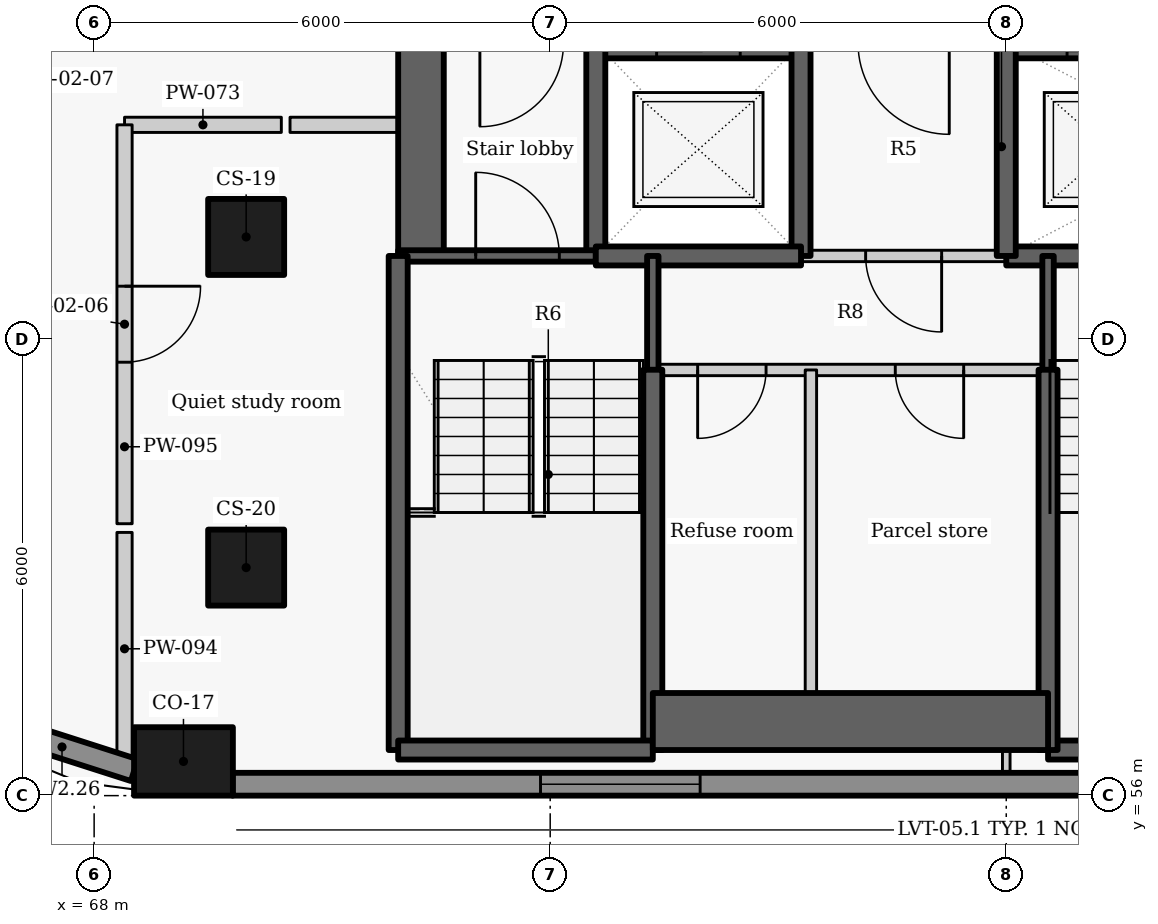
"""IFC4 building model, lengths in metres.
Left out: names, types, materials, properties, quantities, classifications, styles, units other than length and angle.
Written with IfcOpenShell. Run it as: python <this file> out.ifc"""

import sys

from ifc_helpers import new_model, si_unit, direction, frame, frame_2d, origin, origin_2d, place, context, subcontext, project, spatial, rectangle, extrude, element, fill, save


model = new_model("IFC4")
c1 = context("Model", 3, precision=1e-05, world=origin(), true_north=direction((0.0, 1.0)))
c2 = subcontext(c1, "Body", "Model", "MODEL_VIEW")
j1 = project(units=[si_unit("LENGTHUNIT", "METRE"), si_unit("PLANEANGLEUNIT", "RADIAN")], contexts=[c1])
p1 = place(None, origin())
s1 = spatial("IfcSite", under=j1, at=p1, CompositionType="ELEMENT")
p2 = place(p1, origin())
s2 = spatial("IfcBuilding", under=s1, at=p2, CompositionType="ELEMENT")
p3 = place(p2, frame((0.0, 0.0, 130.5)))
s3 = spatial("IfcBuildingStorey", under=s2, at=p3, CompositionType="ELEMENT", Elevation=130.5)
p4 = place(p3, frame((69.175, 56.45, 0.0), z_axis=(0.0, 0.0, 1.0), x_axis=(1.0, 0.0, 0.0)))
e1 = element("IfcColumn", 1, at=p4, inside=s3, PredefinedType="COLUMN", context=c2, shape_type="SweptSolid", body=[
    extrude(rectangle(XDim=1.3, YDim=0.9, at=origin_2d()), origin(), (0.0, 0.0, 1.0), 3.3),
])
for number, where, z_axis, x_axis in (
    (2, (70.0, 63.35, 0.0), (0.0, 0.0, 1.0), (0.0, -1.0, 0.0)),
    (3, (70.0, 59.0, 0.0), (0.0, 0.0, 1.0), (0.0, -1.0, 0.0)),
):
    element("IfcColumn", number, at=place(p3, frame(where, z_axis=z_axis, x_axis=x_axis)), inside=s3, PredefinedType="COLUMN", context=c2, shape_type="SweptSolid", body=[
        extrude(rectangle(XDim=1.0, YDim=1.0, at=origin_2d()), origin(), (0.0, 0.0, 1.0), 3.3),
    ])
p5 = place(p3, frame((66.626, 56.946, 0.0), z_axis=(0.0, 0.0, 1.0), x_axis=(0.952201240673, -0.305471434444, 0.0)))
e4 = element("IfcWall", 4, at=p5, inside=s3, PredefinedType="SOLIDWALL", context=c2, shape_type="SweptSolid", body=[
    extrude(rectangle(XDim=1.999, YDim=0.3, at=frame_2d((1.0, 0.0))), origin(), (0.0, 0.0, 1.0), 2.425),
])
p6 = place(p3, frame((69.821, 56.15, 0.0), z_axis=(0.0, 0.0, 1.0), x_axis=(1.0, 0.0, 0.0)))
e5 = element("IfcWall", 5, at=p6, inside=s3, PredefinedType="SOLIDWALL", context=c2, shape_type="SweptSolid", body=[
    extrude(rectangle(XDim=20.04, YDim=0.3, at=frame_2d((10.02, 0.0))), origin(), (0.0, 0.0, 1.0), 2.425),
])
p7 = place(p6, frame((4.051, 0.0, 0.9)))
e6 = element("IfcOpeningElement", 6, at=p7, cuts=e5, PredefinedType="OPENING", context=c2, shape_type="SweptSolid", body=[
    extrude(rectangle(XDim=2.1, YDim=1.1, at=frame_2d((1.05, 0.55))), frame((0.0, 0.16, 0.0), z_axis=(0.0, -1.0, 0.0), x_axis=(1.0, 0.0, 0.0)), (0.0, 0.0, 1.0), 0.32),
])
p8 = place(p6, frame((14.047, 0.0, 0.9)))
e7 = element("IfcOpeningElement", 7, at=p8, cuts=e5, PredefinedType="OPENING", context=c2, shape_type="SweptSolid", body=[
    extrude(rectangle(XDim=2.1, YDim=1.1, at=frame_2d((1.05, 0.55))), frame((0.0, 0.16, 0.0), z_axis=(0.0, -1.0, 0.0), x_axis=(1.0, 0.0, 0.0)), (0.0, 0.0, 1.0), 0.32),
])
p9 = place(p3, frame((72.3, 63.1, -0.275), z_axis=(0.0, 0.0, 1.0), x_axis=(0.0, 1.0, 0.0)))
e8 = element("IfcWall", 8, at=p9, inside=s3, PredefinedType="SHEAR", context=c2, shape_type="SweptSolid", body=[
    extrude(rectangle(XDim=9.1, YDim=0.6, at=frame_2d((4.55, 0.0))), origin(), (0.0, 0.0, 1.0), 3.3),
])
p10 = place(p9, frame((3.748, 0.0, 0.275)))
e9 = element("IfcOpeningElement", 9, at=p10, cuts=e8, PredefinedType="OPENING", context=c2, shape_type="SweptSolid", body=[
    extrude(rectangle(XDim=1.5, YDim=2.1, at=frame_2d((0.75, 1.05))), frame((0.0, 0.31, 0.0), z_axis=(0.0, -1.0, 0.0), x_axis=(1.0, 0.0, 0.0)), (0.0, 0.0, 1.0), 0.62),
])
p11 = place(p3, frame((74.597, 65.9, -0.275), z_axis=(0.0, 0.0, 1.0), x_axis=(1.0, 0.0, 0.0)))
e10 = element("IfcWall", 10, at=p11, inside=s3, PredefinedType="SHEAR", context=c2, shape_type="SweptSolid", body=[
    extrude(rectangle(XDim=2.706, YDim=0.4, at=frame_2d((1.353, 0.0))), origin(), (0.0, 0.0, 1.0), 3.3),
])
p12 = place(p11, frame((0.803, 0.0, 0.275)))
e11 = element("IfcOpeningElement", 11, at=p12, cuts=e10, PredefinedType="OPENING", context=c2, shape_type="SweptSolid", body=[
    extrude(rectangle(XDim=1.1, YDim=2.1, at=frame_2d((0.55, 1.05))), frame((0.0, 0.21, 0.0), z_axis=(0.0, -1.0, 0.0), x_axis=(1.0, 0.0, 0.0)), (0.0, 0.0, 1.0), 0.42),
])
p13 = place(p3, frame((79.997, 65.9, -0.275), z_axis=(0.0, 0.0, 1.0), x_axis=(1.0, 0.0, 0.0)))
e12 = element("IfcWall", 12, at=p13, inside=s3, PredefinedType="SHEAR", context=c2, shape_type="SweptSolid", body=[
    extrude(rectangle(XDim=5.406, YDim=0.4, at=frame_2d((2.703, 0.0))), origin(), (0.0, 0.0, 1.0), 3.3),
])
p14 = place(p13, frame((0.803, 0.0, 0.275)))
e13 = element("IfcOpeningElement", 13, at=p14, cuts=e12, PredefinedType="OPENING", context=c2, shape_type="SweptSolid", body=[
    extrude(rectangle(XDim=1.1, YDim=2.1, at=frame_2d((0.55, 1.05))), frame((0.0, 0.21, 0.0), z_axis=(0.0, -1.0, 0.0), x_axis=(1.0, 0.0, 0.0)), (0.0, 0.0, 1.0), 0.42),
])
p15 = place(p3, frame((74.6, 63.1, -0.275), z_axis=(0.0, 0.0, 1.0), x_axis=(0.0, 1.0, 0.0)))
e14 = element("IfcWall", 14, at=p15, inside=s3, PredefinedType="SHEAR", context=c2, shape_type="SweptSolid", body=[
    extrude(rectangle(XDim=2.8, YDim=0.25, at=frame_2d((1.4, 0.0))), origin(), (0.0, 0.0, 1.0), 3.3),
])
p16 = place(p3, frame((72.0, 63.1, -0.275), z_axis=(0.0, 0.0, 1.0), x_axis=(1.0, 0.0, 0.0)))
e15 = element("IfcWall", 15, at=p16, inside=s3, PredefinedType="SHEAR", context=c2, shape_type="SweptSolid", body=[
    extrude(rectangle(XDim=2.6, YDim=0.15, at=frame_2d((1.3, 0.0))), origin(), (0.0, 0.0, 1.0), 3.3),
])
p17 = place(p16, frame((1.02, 0.0, 0.275)))
e16 = element("IfcOpeningElement", 16, at=p17, cuts=e15, PredefinedType="OPENING", context=c2, shape_type="SweptSolid", body=[
    extrude(rectangle(XDim=1.1, YDim=2.1, at=frame_2d((0.55, 1.05))), frame((0.0, 0.085, 0.0), z_axis=(0.0, -1.0, 0.0), x_axis=(1.0, 0.0, 0.0)), (0.0, 0.0, 1.0), 0.17),
])
p18 = place(p3, frame((77.3, 63.1, -0.275), z_axis=(0.0, 0.0, 1.0), x_axis=(0.0, 1.0, 0.0)))
e17 = element("IfcWall", 17, at=p18, inside=s3, PredefinedType="SHEAR", context=c2, shape_type="SweptSolid", body=[
    extrude(rectangle(XDim=2.8, YDim=0.25, at=frame_2d((1.4, 0.0))), origin(), (0.0, 0.0, 1.0), 3.3),
])
p19 = place(p3, frame((74.6, 63.1, -0.275), z_axis=(0.0, 0.0, 1.0), x_axis=(1.0, 0.0, 0.0)))
e18 = element("IfcWall", 18, at=p19, inside=s3, PredefinedType="SHEAR", context=c2, shape_type="SweptSolid", body=[
    extrude(rectangle(XDim=2.7, YDim=0.25, at=frame_2d((1.35, 0.0))), origin(), (0.0, 0.0, 1.0), 3.3),
])
p20 = place(p3, frame((80.0, 63.1, -0.275), z_axis=(0.0, 0.0, 1.0), x_axis=(1.0, 0.0, 0.0)))
e19 = element("IfcWall", 19, at=p20, inside=s3, PredefinedType="SHEAR", context=c2, shape_type="SweptSolid", body=[
    extrude(rectangle(XDim=8.0, YDim=0.25, at=frame_2d((4.0, 0.0))), origin(), (0.0, 0.0, 1.0), 3.3),
])
p21 = place(p20, frame((3.849, 0.0, 0.275)))
e20 = element("IfcOpeningElement", 20, at=p21, cuts=e19, PredefinedType="OPENING", context=c2, shape_type="SweptSolid", body=[
    extrude(rectangle(XDim=1.1, YDim=2.1, at=frame_2d((0.55, 1.05))), frame((0.0, 0.135, 0.0), z_axis=(0.0, -1.0, 0.0), x_axis=(1.0, 0.0, 0.0)), (0.0, 0.0, 1.0), 0.27),
])
p22 = place(p3, frame((80.0, 63.1, -0.275), z_axis=(0.0, 0.0, 1.0), x_axis=(0.0, 1.0, 0.0)))
e21 = element("IfcWall", 21, at=p22, inside=s3, PredefinedType="SHEAR", context=c2, shape_type="SweptSolid", body=[
    extrude(rectangle(XDim=2.8, YDim=0.25, at=frame_2d((1.4, 0.0))), origin(), (0.0, 0.0, 1.0), 3.3),
])
p23 = place(p3, frame((80.0, 63.1, 0.0), z_axis=(0.0, 0.0, 1.0), x_axis=(-1.0, 0.0, 0.0)))
e22 = element("IfcWall", 22, at=p23, inside=s3, PredefinedType="PARTITIONING", context=c2, shape_type="SweptSolid", body=[
    extrude(rectangle(XDim=2.7, YDim=0.15, at=frame_2d((1.35, 0.0))), origin(), (0.0, 0.0, 1.0), 3.025),
])
p24 = place(p23, frame((0.85, 0.0, 0.0)))
e23 = element("IfcOpeningElement", 23, at=p24, cuts=e22, PredefinedType="OPENING", context=c2, shape_type="SweptSolid", body=[
    extrude(rectangle(XDim=1.0, YDim=2.1, at=frame_2d((0.5, 1.05))), frame((0.0, 0.085, 0.0), z_axis=(0.0, -1.0, 0.0), x_axis=(1.0, 0.0, 0.0)), (0.0, 0.0, 1.0), 0.17),
])
p25 = place(p3, frame((75.35, 61.597, -0.275), z_axis=(0.0, 0.0, 1.0), x_axis=(0.0, 1.0, 0.0)))
e24 = element("IfcWall", 24, at=p25, inside=s3, PredefinedType="SHEAR", context=c2, shape_type="SweptSolid", body=[
    extrude(rectangle(XDim=1.503, YDim=0.15, at=frame_2d((0.751, 0.0))), origin(), (0.0, 0.0, 1.0), 3.3),
])
p26 = place(p3, frame((75.35, 56.6, -0.275), z_axis=(0.0, 0.0, 1.0), x_axis=(0.0, 1.0, 0.0)))
e25 = element("IfcWall", 25, at=p26, inside=s3, PredefinedType="SHEAR", context=c2, shape_type="SweptSolid", body=[
    extrude(rectangle(XDim=5.003, YDim=0.25, at=frame_2d((2.501, 0.0))), origin(), (0.0, 0.0, 1.0), 3.3),
])
p27 = place(p3, frame((72.0, 56.6, -0.275), z_axis=(0.0, 0.0, 1.0), x_axis=(0.0, 1.0, 0.0)))
e26 = element("IfcWall", 26, at=p27, inside=s3, PredefinedType="SHEAR", context=c2, shape_type="SweptSolid", body=[
    extrude(rectangle(XDim=6.5, YDim=0.25, at=frame_2d((3.25, 0.0))), origin(), (0.0, 0.0, 1.0), 3.3),
])
p28 = place(p3, frame((72.0, 56.6, -0.275), z_axis=(0.0, 0.0, 1.0), x_axis=(1.0, 0.0, 0.0)))
e27 = element("IfcWall", 27, at=p28, inside=s3, PredefinedType="SHEAR", context=c2, shape_type="SweptSolid", body=[
    extrude(rectangle(XDim=3.35, YDim=0.25, at=frame_2d((1.675, 0.0))), origin(), (0.0, 0.0, 1.0), 3.3),
])
p29 = place(p3, frame((80.55, 56.6, -0.275), z_axis=(0.0, 0.0, 1.0), x_axis=(1.0, 0.0, 0.0)))
e28 = element("IfcWall", 28, at=p29, inside=s3, PredefinedType="SHEAR", context=c2, shape_type="SweptSolid", body=[
    extrude(rectangle(XDim=2.85, YDim=0.25, at=frame_2d((1.425, 0.0))), origin(), (0.0, 0.0, 1.0), 3.3),
])
p30 = place(p3, frame((80.55, 61.597, -0.275), z_axis=(0.0, 0.0, 1.0), x_axis=(0.0, 1.0, 0.0)))
e29 = element("IfcWall", 29, at=p30, inside=s3, PredefinedType="SHEAR", context=c2, shape_type="SweptSolid", body=[
    extrude(rectangle(XDim=1.503, YDim=0.15, at=frame_2d((0.751, 0.0))), origin(), (0.0, 0.0, 1.0), 3.3),
])
p31 = place(p3, frame((80.55, 56.6, -0.275), z_axis=(0.0, 0.0, 1.0), x_axis=(0.0, 1.0, 0.0)))
e30 = element("IfcWall", 30, at=p31, inside=s3, PredefinedType="SHEAR", context=c2, shape_type="SweptSolid", body=[
    extrude(rectangle(XDim=5.003, YDim=0.25, at=frame_2d((2.501, 0.0))), origin(), (0.0, 0.0, 1.0), 3.3),
])
p32 = place(p3, frame((75.35, 56.975, -0.275), z_axis=(0.0, 0.0, 1.0), x_axis=(1.0, 0.0, 0.0)))
e31 = element("IfcWall", 31, at=p32, inside=s3, PredefinedType="SHEAR", context=c2, shape_type="SweptSolid", body=[
    extrude(rectangle(XDim=5.2, YDim=0.75, at=frame_2d((2.6, 0.0))), origin(), (0.0, 0.0, 1.0), 3.3),
])
p33 = place(p3, frame((80.55, 61.6, 0.0), z_axis=(0.0, 0.0, 1.0), x_axis=(-1.0, 0.0, 0.0)))
e32 = element("IfcWall", 32, at=p33, inside=s3, PredefinedType="PARTITIONING", context=c2, shape_type="SweptSolid", body=[
    extrude(rectangle(XDim=5.2, YDim=0.15, at=frame_2d((2.6, 0.0))), origin(), (0.0, 0.0, 1.0), 3.025),
])
p34 = place(p33, frame((3.71, 0.0, 0.0)))
e33 = element("IfcOpeningElement", 33, at=p34, cuts=e32, PredefinedType="OPENING", context=c2, shape_type="SweptSolid", body=[
    extrude(rectangle(XDim=0.9, YDim=2.1, at=frame_2d((0.45, 1.05))), frame((0.0, 0.085, 0.0), z_axis=(0.0, -1.0, 0.0), x_axis=(1.0, 0.0, 0.0)), (0.0, 0.0, 1.0), 0.17),
])
p35 = place(p33, frame((1.11, 0.0, 0.0)))
e34 = element("IfcOpeningElement", 34, at=p35, cuts=e32, PredefinedType="OPENING", context=c2, shape_type="SweptSolid", body=[
    extrude(rectangle(XDim=0.9, YDim=2.1, at=frame_2d((0.45, 1.05))), frame((0.0, 0.085, 0.0), z_axis=(0.0, -1.0, 0.0), x_axis=(1.0, 0.0, 0.0)), (0.0, 0.0, 1.0), 0.17),
])
p36 = place(p3, frame((77.43, 56.6, 0.0), z_axis=(0.0, 0.0, 1.0), x_axis=(0.0, 1.0, 0.0)))
e35 = element("IfcWall", 35, at=p36, inside=s3, PredefinedType="PARTITIONING", context=c2, shape_type="SweptSolid", body=[
    extrude(rectangle(XDim=5.0, YDim=0.15, at=frame_2d((2.5, 0.0))), origin(), (0.0, 0.0, 1.0), 3.025),
])
p37 = place(p3, frame((68.4, 64.825, 0.0), z_axis=(0.0, 0.0, 1.0), x_axis=(1.0, 0.0, 0.0)))
e36 = element("IfcWall", 36, at=p37, inside=s3, PredefinedType="PARTITIONING", context=c2, shape_type="SweptSolid", body=[
    extrude(rectangle(XDim=2.063, YDim=0.2, at=frame_2d((1.031, 0.0))), origin(), (0.0, 0.0, 1.0), 2.505),
])
p38 = place(p3, frame((70.577, 64.825, 0.0), z_axis=(0.0, 0.0, 1.0), x_axis=(1.0, 0.0, 0.0)))
e37 = element("IfcWall", 37, at=p38, inside=s3, PredefinedType="PARTITIONING", context=c2, shape_type="SweptSolid", body=[
    extrude(rectangle(XDim=1.423, YDim=0.2, at=frame_2d((0.711, 0.0))), origin(), (0.0, 0.0, 1.0), 3.025),
])
p39 = place(p3, frame((68.4, 56.401, 0.0), z_axis=(0.0, 0.0, 1.0), x_axis=(0.0, 1.0, 0.0)))
e38 = element("IfcWall", 38, at=p39, inside=s3, PredefinedType="PARTITIONING", context=c2, shape_type="SweptSolid", body=[
    extrude(rectangle(XDim=3.062, YDim=0.2, at=frame_2d((1.531, 0.0))), origin(), (0.0, 0.0, 1.0), 2.405),
])
p40 = place(p3, frame((68.4, 64.825, 0.0), z_axis=(0.0, 0.0, 1.0), x_axis=(0.0, -1.0, 0.0)))
e39 = element("IfcWall", 39, at=p40, inside=s3, PredefinedType="PARTITIONING", context=c2, shape_type="SweptSolid", body=[
    extrude(rectangle(XDim=5.248, YDim=0.2, at=frame_2d((2.624, 0.0))), origin(), (0.0, 0.0, 1.0), 3.025),
])
p41 = place(p40, frame((2.123, 0.0, 0.0)))
e40 = element("IfcOpeningElement", 40, at=p41, cuts=e39, PredefinedType="OPENING", context=c2, shape_type="SweptSolid", body=[
    extrude(rectangle(XDim=1.0, YDim=2.1, at=frame_2d((0.5, 1.05))), frame((0.0, 0.11, 0.0), z_axis=(0.0, -1.0, 0.0), x_axis=(1.0, 0.0, 0.0)), (0.0, 0.0, 1.0), 0.22),
])
p42 = place(p3, frame((80.0, 56.3, 0.0), z_axis=(0.0, 0.0, 1.0), x_axis=(0.0, 1.0, 0.0)))
e41 = element("IfcWall", 41, at=p42, inside=s3, PredefinedType="PARTITIONING", context=c2, shape_type="SweptSolid", body=[
    extrude(rectangle(XDim=0.3, YDim=0.1, at=frame_2d((0.15, 0.0))), origin(), (0.0, 0.0, 1.0), 3.025),
])
p43 = place(p7, origin())
e42 = element("IfcWindow", 42, at=p43, inside=s3, PartitioningType="SINGLE_PANEL", PredefinedType="WINDOW", context=c2, shape_type="SweptSolid", body=[
    extrude(rectangle(XDim=2.1, YDim=1.1, at=frame_2d((1.05, 0.55))), frame((0.0, 0.03, 0.0), z_axis=(0.0, -1.0, 0.0), x_axis=(1.0, 0.0, 0.0)), (0.0, 0.0, 1.0), 0.06),
])
fill(e6, e42)
p44 = place(p24, origin())
e43 = element("IfcDoor", 43, at=p44, inside=s3, OperationType="SINGLE_SWING_LEFT", PredefinedType="DOOR", context=c2, shape_type="SweptSolid", body=[
    extrude(rectangle(XDim=1.0, YDim=2.1, at=frame_2d((0.5, 1.05))), frame((0.0, 0.025, 0.0), z_axis=(0.0, -1.0, 0.0), x_axis=(1.0, 0.0, 0.0)), (0.0, 0.0, 1.0), 0.05),
])
fill(e23, e43)
p45 = place(p34, origin())
e44 = element("IfcDoor", 44, at=p45, inside=s3, OperationType="SINGLE_SWING_RIGHT", PredefinedType="DOOR", context=c2, shape_type="SweptSolid", body=[
    extrude(rectangle(XDim=0.9, YDim=2.1, at=frame_2d((0.45, 1.05))), frame((0.0, 0.025, 0.0), z_axis=(0.0, -1.0, 0.0), x_axis=(1.0, 0.0, 0.0)), (0.0, 0.0, 1.0), 0.05),
])
fill(e33, e44)
p46 = place(p35, origin())
e45 = element("IfcDoor", 45, at=p46, inside=s3, OperationType="SINGLE_SWING_LEFT", PredefinedType="DOOR", context=c2, shape_type="SweptSolid", body=[
    extrude(rectangle(XDim=0.9, YDim=2.1, at=frame_2d((0.45, 1.05))), frame((0.0, 0.025, 0.0), z_axis=(0.0, -1.0, 0.0), x_axis=(1.0, 0.0, 0.0)), (0.0, 0.0, 1.0), 0.05),
])
fill(e34, e45)
p47 = place(p17, origin())
e46 = element("IfcDoor", 46, at=p47, inside=s3, OperationType="SINGLE_SWING_LEFT", PredefinedType="DOOR", context=c2, shape_type="SweptSolid", body=[
    extrude(rectangle(XDim=1.1, YDim=2.1, at=frame_2d((0.55, 1.05))), frame((0.0, 0.025, 0.0), z_axis=(0.0, -1.0, 0.0), x_axis=(1.0, 0.0, 0.0)), (0.0, 0.0, 1.0), 0.05),
])
fill(e16, e46)
p48 = place(p41, origin())
e47 = element("IfcDoor", 47, at=p48, inside=s3, OperationType="SINGLE_SWING_LEFT", PredefinedType="DOOR", context=c2, shape_type="SweptSolid", body=[
    extrude(rectangle(XDim=1.0, YDim=2.1, at=frame_2d((0.5, 1.05))), frame((0.0, 0.025, 0.0), z_axis=(0.0, -1.0, 0.0), x_axis=(1.0, 0.0, 0.0)), (0.0, 0.0, 1.0), 0.05),
])
fill(e40, e47)
save(model, sys.argv[1])
